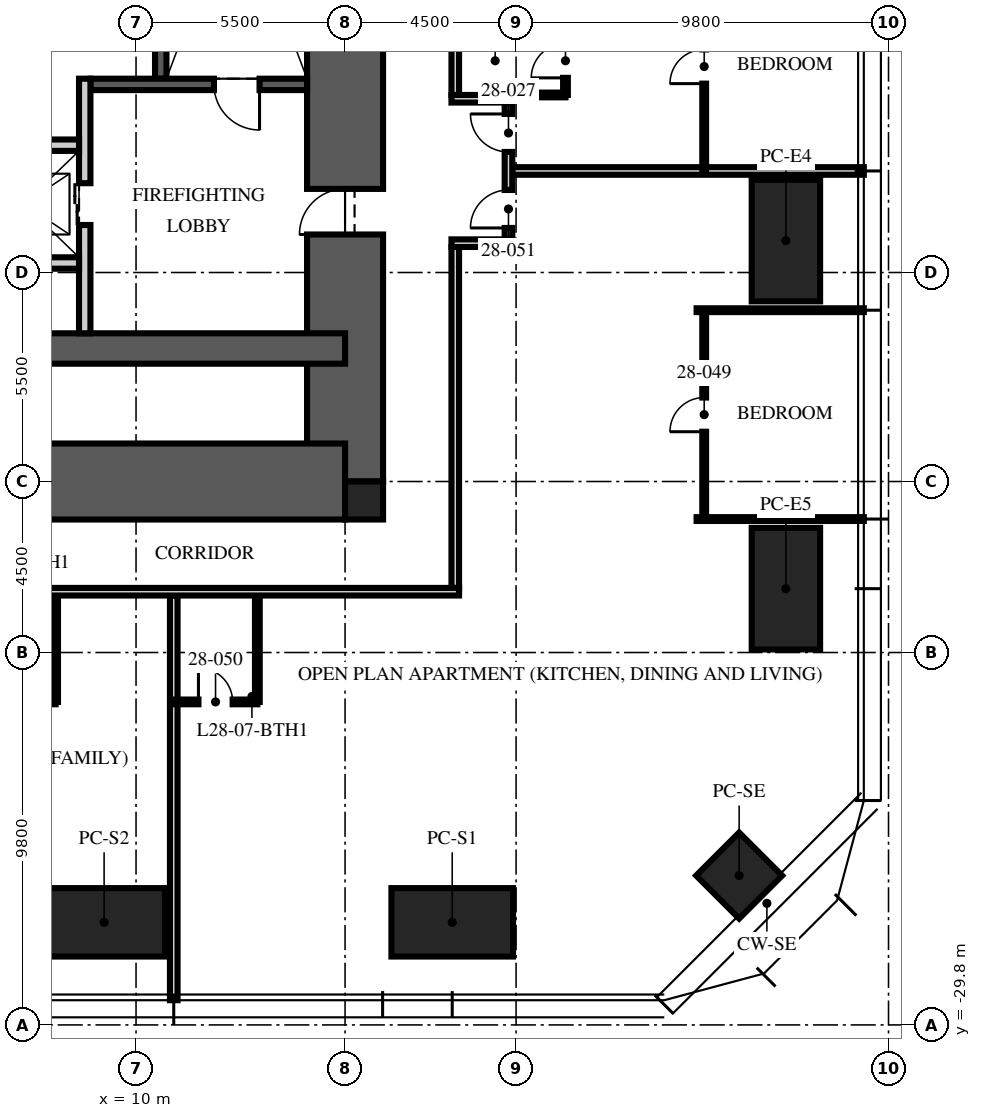
"""IFC4 building model, lengths in metres.
Left out: names, types, materials, properties, quantities, classifications, styles, units other than length and angle.
Written with IfcOpenShell. Run it as: python <this file> out.ifc"""

import sys

from ifc_helpers import new_model, si_unit, direction, frame, frame_2d, origin, origin_2d, place, context, subcontext, project, spatial, rectangle, hollow_rectangle, extrude, element, fill, save


model = new_model("IFC4")
c1 = context("Model", 3, precision=1e-05, world=origin(), true_north=direction((0.0, 1.0)))
c2 = subcontext(c1, "Body", "Model", "MODEL_VIEW")
j1 = project(units=[si_unit("LENGTHUNIT", "METRE"), si_unit("PLANEANGLEUNIT", "RADIAN")], contexts=[c1])
p1 = place(None, origin())
s1 = spatial("IfcSite", under=j1, at=p1, CompositionType="ELEMENT")
p2 = place(p1, origin())
s2 = spatial("IfcBuilding", under=s1, at=p2, CompositionType="ELEMENT")
p3 = place(p2, frame((0.0, 0.0, 114.75)))
s3 = spatial("IfcBuildingStorey", under=s2, at=p3, CompositionType="ELEMENT", Elevation=114.75)
p4 = place(p3, frame((15.5, -15.5, -0.25), z_axis=(0.0, 0.0, 1.0), x_axis=(0.0, 1.0, 0.0)))
e1 = element("IfcWall", 1, at=p4, inside=s3, PredefinedType="SHEAR", context=c2, shape_type="SweptSolid", body=[
    extrude(rectangle(XDim=31.0, YDim=2.0, at=frame_2d((15.5, 0.0))), origin(), (0.0, 0.0, 1.0), 3.75),
])
p5 = place(p4, frame((6.5, 0.0, 0.25)))
e2 = element("IfcOpeningElement", 2, at=p5, cuts=e1, PredefinedType="OPENING", context=c2, shape_type="SweptSolid", body=[
    extrude(rectangle(XDim=1.2, YDim=2.1, at=frame_2d((0.6, 1.05))), frame((0.0, 1.01, 0.0), z_axis=(0.0, -1.0, 0.0), x_axis=(1.0, 0.0, 0.0)), (0.0, 0.0, 1.0), 2.02),
])
p6 = place(p4, frame((23.0, 0.0, 0.25)))
e3 = element("IfcOpeningElement", 3, at=p6, cuts=e1, PredefinedType="OPENING", context=c2, shape_type="SweptSolid", body=[
    extrude(rectangle(XDim=1.8, YDim=2.1, at=frame_2d((0.9, 1.05))), frame((0.0, 1.01, 0.0), z_axis=(0.0, -1.0, 0.0), x_axis=(1.0, 0.0, 0.0)), (0.0, 0.0, 1.0), 2.02),
])
p7 = place(p3, frame((-15.5, -15.5, -0.25), z_axis=(0.0, 0.0, 1.0), x_axis=(1.0, 0.0, 0.0)))
e4 = element("IfcWall", 4, at=p7, inside=s3, PredefinedType="SHEAR", context=c2, shape_type="SweptSolid", body=[
    extrude(rectangle(XDim=31.0, YDim=2.0, at=frame_2d((15.5, 0.0))), origin(), (0.0, 0.0, 1.0), 3.75),
])
p8 = place(p7, frame((10.4, 0.0, 0.25)))
e5 = element("IfcOpeningElement", 5, at=p8, cuts=e4, PredefinedType="OPENING", context=c2, shape_type="SweptSolid", body=[
    extrude(rectangle(XDim=1.1, YDim=2.1, at=frame_2d((0.55, 1.05))), frame((0.0, 1.01, 0.0), z_axis=(0.0, -1.0, 0.0), x_axis=(1.0, 0.0, 0.0)), (0.0, 0.0, 1.0), 2.02),
])
p9 = place(p7, frame((13.5, 0.0, 0.25)))
e6 = element("IfcOpeningElement", 6, at=p9, cuts=e4, PredefinedType="OPENING", context=c2, shape_type="SweptSolid", body=[
    extrude(rectangle(XDim=1.1, YDim=2.1, at=frame_2d((0.55, 1.05))), frame((0.0, 1.01, 0.0), z_axis=(0.0, -1.0, 0.0), x_axis=(1.0, 0.0, 0.0)), (0.0, 0.0, 1.0), 2.02),
])
p10 = place(p7, frame((16.6, 0.0, 0.25)))
e7 = element("IfcOpeningElement", 7, at=p10, cuts=e4, PredefinedType="OPENING", context=c2, shape_type="SweptSolid", body=[
    extrude(rectangle(XDim=1.1, YDim=2.1, at=frame_2d((0.55, 1.05))), frame((0.0, 1.01, 0.0), z_axis=(0.0, -1.0, 0.0), x_axis=(1.0, 0.0, 0.0)), (0.0, 0.0, 1.0), 2.02),
])
p11 = place(p3, frame((-15.5, -12.0, -0.25), z_axis=(0.0, 0.0, 1.0), x_axis=(1.0, 0.0, 0.0)))
e8 = element("IfcWall", 8, at=p11, inside=s3, PredefinedType="SHEAR", context=c2, shape_type="SweptSolid", body=[
    extrude(rectangle(XDim=31.0, YDim=0.8, at=frame_2d((15.5, 0.0))), origin(), (0.0, 0.0, 1.0), 3.75),
])
p12 = place(p3, frame((16.0, -16.0, -0.25), z_axis=(0.0, 0.0, 1.0), x_axis=(1.0, 0.0, 0.0)))
e9 = element("IfcColumn", 9, at=p12, inside=s3, PredefinedType="COLUMN", context=c2, shape_type="SweptSolid", body=[
    extrude(rectangle(XDim=1.0, YDim=1.0, at=origin_2d()), origin(), (0.0, 0.0, 1.0), 3.75),
])
for number, where, z_axis, x_axis in (
    (10, (27.1, -9.16, 0.0), (0.0, 0.0, 1.0), (0.0, 1.0, 0.0)),
    (11, (27.1, -18.32, 0.0), (0.0, 0.0, 1.0), (0.0, 1.0, 0.0)),
    (12, (18.32, -27.1, 0.0), (0.0, 0.0, 1.0), (1.0, 0.0, 0.0)),
    (13, (9.16, -27.1, 0.0), (0.0, 0.0, 1.0), (1.0, 0.0, 0.0)),
):
    element("IfcColumn", number, at=place(p3, frame(where, z_axis=z_axis, x_axis=x_axis)), inside=s3, PredefinedType="COLUMN", context=c2, shape_type="SweptSolid", body=[
        extrude(hollow_rectangle(XDim=3.2, YDim=1.8, WallThickness=0.2, at=origin_2d()), origin(), (0.0, 0.0, 1.0), 3.75),
    ])
p13 = place(p3, frame((25.87, -25.87, 0.0), z_axis=(0.0, 0.0, 1.0), x_axis=(0.707106781187, 0.707106781187, 0.0)))
e14 = element("IfcColumn", 14, at=p13, inside=s3, PredefinedType="COLUMN", context=c2, shape_type="SweptSolid", body=[
    extrude(hollow_rectangle(XDim=1.6, YDim=1.6, WallThickness=0.1, at=origin_2d()), origin(), (0.0, 0.0, 1.0), 3.75),
])
p14 = place(p3, frame((10.65, -4.9, 0.0), z_axis=(0.0, 0.0, 1.0), x_axis=(0.0, 1.0, 0.0)))
e15 = element("IfcWall", 15, at=p14, inside=s3, PredefinedType="SOLIDWALL", context=c2, shape_type="SweptSolid", body=[
    extrude(rectangle(XDim=10.1, YDim=0.3, at=frame_2d((5.05, 0.0))), origin(), (0.0, 0.0, 1.0), 3.5),
])
p15 = place(p3, frame((14.5, -5.05, 0.0), z_axis=(0.0, 0.0, 1.0), x_axis=(-1.0, 0.0, 0.0)))
e16 = element("IfcWall", 16, at=p15, inside=s3, PredefinedType="SOLIDWALL", context=c2, shape_type="SweptSolid", body=[
    extrude(rectangle(XDim=5.7, YDim=0.3, at=frame_2d((2.85, 0.0))), origin(), (0.0, 0.0, 1.0), 3.5),
])
p16 = place(p15, frame((1.25, 0.0, 0.0)))
e17 = element("IfcOpeningElement", 17, at=p16, cuts=e16, PredefinedType="OPENING", context=c2, shape_type="SweptSolid", body=[
    extrude(rectangle(XDim=1.2, YDim=2.1, at=frame_2d((0.6, 1.05))), frame((0.0, 0.16, 0.0), z_axis=(0.0, -1.0, 0.0), x_axis=(1.0, 0.0, 0.0)), (0.0, 0.0, 1.0), 0.32),
])
p17 = place(p3, frame((8.65, -11.6, 0.0), z_axis=(0.0, 0.0, 1.0), x_axis=(0.0, 1.0, 0.0)))
e18 = element("IfcWall", 18, at=p17, inside=s3, PredefinedType="PARTITIONING", context=c2, shape_type="SweptSolid", body=[
    extrude(rectangle(XDim=6.7, YDim=0.3, at=frame_2d((3.35, 0.0))), origin(), (0.0, 0.0, 1.0), 3.5),
])
p18 = place(p17, frame((2.85, 0.0, 0.0)))
e19 = element("IfcOpeningElement", 19, at=p18, cuts=e18, PredefinedType="OPENING", context=c2, shape_type="SweptSolid", body=[
    extrude(rectangle(XDim=1.1, YDim=2.1, at=frame_2d((0.55, 1.05))), frame((0.0, 0.16, 0.0), z_axis=(0.0, -1.0, 0.0), x_axis=(1.0, 0.0, 0.0)), (0.0, 0.0, 1.0), 0.32),
])
p19 = place(p3, frame((-8.5, -6.65, 0.0), z_axis=(0.0, 0.0, 1.0), x_axis=(1.0, 0.0, 0.0)))
e20 = element("IfcWall", 20, at=p19, inside=s3, PredefinedType="PARTITIONING", context=c2, shape_type="SweptSolid", body=[
    extrude(rectangle(XDim=17.0, YDim=0.3, at=frame_2d((8.5, 0.0))), origin(), (0.0, 0.0, 1.0), 3.5),
])
p20 = place(p19, frame((7.8, 0.0, 0.0)))
e21 = element("IfcOpeningElement", 21, at=p20, cuts=e20, PredefinedType="OPENING", context=c2, shape_type="SweptSolid", body=[
    extrude(rectangle(XDim=1.3, YDim=2.4, at=frame_2d((0.65, 1.2))), frame((0.0, 0.16, 0.0), z_axis=(0.0, -1.0, 0.0), x_axis=(1.0, 0.0, 0.0)), (0.0, 0.0, 1.0), 0.32),
])
p21 = place(p19, frame((5.65, 0.0, 0.0)))
e22 = element("IfcOpeningElement", 22, at=p21, cuts=e20, PredefinedType="OPENING", context=c2, shape_type="SweptSolid", body=[
    extrude(rectangle(XDim=0.9, YDim=2.1, at=frame_2d((0.45, 1.05))), frame((0.0, 0.16, 0.0), z_axis=(0.0, -1.0, 0.0), x_axis=(1.0, 0.0, 0.0)), (0.0, 0.0, 1.0), 0.32),
])
p22 = place(p19, frame((10.4, 0.0, 0.0)))
e23 = element("IfcOpeningElement", 23, at=p22, cuts=e20, PredefinedType="OPENING", context=c2, shape_type="SweptSolid", body=[
    extrude(rectangle(XDim=0.9, YDim=2.1, at=frame_2d((0.45, 1.05))), frame((0.0, 0.16, 0.0), z_axis=(0.0, -1.0, 0.0), x_axis=(1.0, 0.0, 0.0)), (0.0, 0.0, 1.0), 0.32),
])
p23 = place(p3, frame((5.6, -9.75, 0.0), z_axis=(0.0, 0.0, 1.0), x_axis=(1.0, 0.0, 0.0)))
e24 = element("IfcWall", 24, at=p23, inside=s3, PredefinedType="PARTITIONING", context=c2, shape_type="SweptSolid", body=[
    extrude(rectangle(XDim=2.9, YDim=0.3, at=frame_2d((1.45, 0.0))), origin(), (0.0, 0.0, 1.0), 3.5),
])
p24 = place(p3, frame((19.9, -7.328, 0.0), z_axis=(0.0, 0.0, 1.0), x_axis=(1.0, 0.0, 0.0)))
e25 = element("IfcWall", 25, at=p24, inside=s3, PredefinedType="PARTITIONING", context=c2, shape_type="SweptSolid", body=[
    extrude(rectangle(XDim=9.25, YDim=0.2, at=frame_2d((4.625, 0.0))), origin(), (0.0, 0.0, 1.0), 2.81),
])
p25 = place(p3, frame((10.992, -18.5, 0.0), z_axis=(0.0, 0.0, 1.0), x_axis=(0.0, -1.0, 0.0)))
e26 = element("IfcWall", 26, at=p25, inside=s3, PredefinedType="PARTITIONING", context=c2, shape_type="SweptSolid", body=[
    extrude(rectangle(XDim=10.65, YDim=0.2, at=frame_2d((5.325, 0.0))), origin(), (0.0, 0.0, 1.0), 2.81),
])
for number, where, z_axis, x_axis in (
    (27, (24.75, -16.488, 0.0), (0.0, 0.0, 1.0), (1.0, 0.0, 0.0)),
    (28, (24.75, -10.992, 0.0), (0.0, 0.0, 1.0), (1.0, 0.0, 0.0)),
):
    element("IfcWall", number, at=place(p3, frame(where, z_axis=z_axis, x_axis=x_axis)), inside=s3, PredefinedType="PARTITIONING", context=c2, shape_type="SweptSolid", body=[
        extrude(rectangle(XDim=4.4, YDim=0.1, at=frame_2d((2.2, 0.0))), origin(), (0.0, 0.0, 1.0), 2.81),
    ])
p26 = place(p3, frame((24.95, -7.328, 0.0), z_axis=(0.0, 0.0, 1.0), x_axis=(0.0, 1.0, 0.0)))
e29 = element("IfcWall", 29, at=p26, inside=s3, PredefinedType="PARTITIONING", context=c2, shape_type="SweptSolid", body=[
    extrude(rectangle(XDim=5.496, YDim=0.1, at=frame_2d((2.748, 0.0))), origin(), (0.0, 0.0, 1.0), 2.81),
])
p27 = place(p26, frame((2.298, 0.0, 0.0)))
e30 = element("IfcOpeningElement", 30, at=p27, cuts=e29, PredefinedType="OPENING", context=c2, shape_type="SweptSolid", body=[
    extrude(rectangle(XDim=0.9, YDim=2.1, at=frame_2d((0.45, 1.05))), frame((0.0, 0.06, 0.0), z_axis=(0.0, -1.0, 0.0), x_axis=(1.0, 0.0, 0.0)), (0.0, 0.0, 1.0), 0.12),
])
p28 = place(p3, frame((21.3, -5.328, 0.0), z_axis=(0.0, 0.0, 1.0), x_axis=(0.0, 1.0, 0.0)))
e31 = element("IfcWall", 31, at=p28, inside=s3, PredefinedType="PARTITIONING", context=c2, shape_type="SweptSolid", body=[
    extrude(rectangle(XDim=1.8, YDim=0.125, at=frame_2d((0.9, 0.0))), origin(), (0.0, 0.0, 1.0), 2.81),
])
p29 = place(p28, frame((0.45, 0.0, 0.0)))
e32 = element("IfcOpeningElement", 32, at=p29, cuts=e31, PredefinedType="OPENING", context=c2, shape_type="SweptSolid", body=[
    extrude(rectangle(XDim=0.9, YDim=2.1, at=frame_2d((0.45, 1.05))), frame((0.0, 0.073, 0.0), z_axis=(0.0, -1.0, 0.0), x_axis=(1.0, 0.0, 0.0)), (0.0, 0.0, 1.0), 0.145),
])
p30 = place(p3, frame((19.97, -5.328, 0.0), z_axis=(0.0, 0.0, 1.0), x_axis=(1.0, 0.0, 0.0)))
e33 = element("IfcWall", 33, at=p30, inside=s3, PredefinedType="PARTITIONING", context=c2, shape_type="SweptSolid", body=[
    extrude(rectangle(XDim=1.33, YDim=0.125, at=frame_2d((0.665, 0.0))), origin(), (0.0, 0.0, 1.0), 3.5),
])
p31 = place(p3, frame((5.684, -21.3, 0.0), z_axis=(0.0, 0.0, 1.0), x_axis=(1.0, 0.0, 0.0)))
e34 = element("IfcWall", 34, at=p31, inside=s3, PredefinedType="PARTITIONING", context=c2, shape_type="SweptSolid", body=[
    extrude(rectangle(XDim=2.2, YDim=0.125, at=frame_2d((1.1, 0.0))), origin(), (0.0, 0.0, 1.0), 3.5),
])
p32 = place(p31, frame((0.65, 0.0, 0.0)))
e35 = element("IfcOpeningElement", 35, at=p32, cuts=e34, PredefinedType="OPENING", context=c2, shape_type="SweptSolid", body=[
    extrude(rectangle(XDim=0.9, YDim=2.1, at=frame_2d((0.45, 1.05))), frame((0.0, 0.073, 0.0), z_axis=(0.0, -1.0, 0.0), x_axis=(1.0, 0.0, 0.0)), (0.0, 0.0, 1.0), 0.145),
])
p33 = place(p3, frame((7.884, -18.5, 0.0), z_axis=(0.0, 0.0, 1.0), x_axis=(0.0, -1.0, 0.0)))
e36 = element("IfcWall", 36, at=p33, inside=s3, PredefinedType="PARTITIONING", context=c2, shape_type="SweptSolid", body=[
    extrude(rectangle(XDim=2.8, YDim=0.125, at=frame_2d((1.4, 0.0))), origin(), (0.0, 0.0, 1.0), 3.5),
])
p34 = place(p3, frame((24.95, -16.488, 0.0), z_axis=(0.0, 0.0, 1.0), x_axis=(0.0, 1.0, 0.0)))
e37 = element("IfcWall", 37, at=p34, inside=s3, PredefinedType="PARTITIONING", context=c2, shape_type="SweptSolid", body=[
    extrude(rectangle(XDim=5.496, YDim=0.1, at=frame_2d((2.748, 0.0))), origin(), (0.0, 0.0, 1.0), 2.81),
])
p35 = place(p34, frame((2.298, 0.0, 0.0)))
e38 = element("IfcOpeningElement", 38, at=p35, cuts=e37, PredefinedType="OPENING", context=c2, shape_type="SweptSolid", body=[
    extrude(rectangle(XDim=0.9, YDim=2.1, at=frame_2d((0.45, 1.05))), frame((0.0, 0.06, 0.0), z_axis=(0.0, -1.0, 0.0), x_axis=(1.0, 0.0, 0.0)), (0.0, 0.0, 1.0), 0.12),
])
p36 = place(p3, frame((10.992, -21.3, 0.0), z_axis=(0.0, 0.0, 1.0), x_axis=(1.0, 0.0, 0.0)))
e39 = element("IfcWall", 39, at=p36, inside=s3, PredefinedType="PARTITIONING", context=c2, shape_type="SweptSolid", body=[
    extrude(rectangle(XDim=2.2, YDim=0.125, at=frame_2d((1.1, 0.0))), origin(), (0.0, 0.0, 1.0), 3.5),
])
p37 = place(p36, frame((0.65, 0.0, 0.0)))
e40 = element("IfcOpeningElement", 40, at=p37, cuts=e39, PredefinedType="OPENING", context=c2, shape_type="SweptSolid", body=[
    extrude(rectangle(XDim=0.9, YDim=2.1, at=frame_2d((0.45, 1.05))), frame((0.0, 0.073, 0.0), z_axis=(0.0, -1.0, 0.0), x_axis=(1.0, 0.0, 0.0)), (0.0, 0.0, 1.0), 0.145),
])
p38 = place(p3, frame((13.192, -18.5, 0.0), z_axis=(0.0, 0.0, 1.0), x_axis=(0.0, -1.0, 0.0)))
e41 = element("IfcWall", 41, at=p38, inside=s3, PredefinedType="PARTITIONING", context=c2, shape_type="SweptSolid", body=[
    extrude(rectangle(XDim=2.8, YDim=0.125, at=frame_2d((1.4, 0.0))), origin(), (0.0, 0.0, 1.0), 3.5),
])
p39 = place(p3, frame((18.4, -18.3, 0.0), z_axis=(0.0, 0.0, 1.0), x_axis=(0.0, 1.0, 0.0)))
e42 = element("IfcWall", 42, at=p39, inside=s3, PredefinedType="PARTITIONING", context=c2, shape_type="SweptSolid", body=[
    extrude(rectangle(XDim=8.972, YDim=0.2, at=frame_2d((4.486, 0.0))), origin(), (0.0, 0.0, 1.0), 2.3),
])
p40 = place(p3, frame((18.3, -9.228, 0.0), z_axis=(0.0, 0.0, 1.0), x_axis=(1.0, 0.0, 0.0)))
e43 = element("IfcWall", 43, at=p40, inside=s3, PredefinedType="PARTITIONING", context=c2, shape_type="SweptSolid", body=[
    extrude(rectangle(XDim=1.6, YDim=0.2, at=frame_2d((0.8, 0.0))), origin(), (0.0, 0.0, 1.0), 2.7),
])
p41 = place(p3, frame((18.3, -5.428, 0.0), z_axis=(0.0, 0.0, 1.0), x_axis=(1.0, 0.0, 0.0)))
e44 = element("IfcWall", 44, at=p41, inside=s3, PredefinedType="PARTITIONING", context=c2, shape_type="SweptSolid", body=[
    extrude(rectangle(XDim=1.6, YDim=0.2, at=frame_2d((0.8, 0.0))), origin(), (0.0, 0.0, 1.0), 3.5),
])
p42 = place(p3, frame((19.8, -9.128, 0.0), z_axis=(0.0, 0.0, 1.0), x_axis=(0.0, 1.0, 0.0)))
e45 = element("IfcWall", 45, at=p42, inside=s3, PredefinedType="PARTITIONING", context=c2, shape_type="SweptSolid", body=[
    extrude(rectangle(XDim=3.6, YDim=0.2, at=frame_2d((1.8, 0.0))), origin(), (0.0, 0.0, 1.0), 2.7),
])
p43 = place(p42, frame((2.3, 0.0, 0.0)))
e46 = element("IfcOpeningElement", 46, at=p43, cuts=e45, PredefinedType="OPENING", context=c2, shape_type="SweptSolid", body=[
    extrude(rectangle(XDim=1.0, YDim=2.2, at=frame_2d((0.5, 1.1))), frame((0.0, 0.11, 0.0), z_axis=(0.0, -1.0, 0.0), x_axis=(1.0, 0.0, 0.0)), (0.0, 0.0, 1.0), 0.22),
])
p44 = place(p42, frame((0.3, 0.0, 0.0)))
e47 = element("IfcOpeningElement", 47, at=p44, cuts=e45, PredefinedType="OPENING", context=c2, shape_type="SweptSolid", body=[
    extrude(rectangle(XDim=1.0, YDim=2.2, at=frame_2d((0.5, 1.1))), frame((0.0, 0.11, 0.0), z_axis=(0.0, -1.0, 0.0), x_axis=(1.0, 0.0, 0.0)), (0.0, 0.0, 1.0), 0.22),
])
p45 = place(p3, frame((18.4, -5.328, 0.0), z_axis=(0.0, 0.0, 1.0), x_axis=(0.0, 1.0, 0.0)))
e48 = element("IfcWall", 48, at=p45, inside=s3, PredefinedType="PARTITIONING", context=c2, shape_type="SweptSolid", body=[
    extrude(rectangle(XDim=22.028, YDim=0.2, at=frame_2d((11.014, 0.0))), origin(), (0.0, 0.0, 1.0), 2.7),
])
p46 = place(p45, frame((19.84, 0.0, 0.0)))
e49 = element("IfcOpeningElement", 49, at=p46, cuts=e48, PredefinedType="OPENING", context=c2, shape_type="SweptSolid", body=[
    extrude(rectangle(XDim=1.0, YDim=2.2, at=frame_2d((0.5, 1.1))), frame((0.0, 0.11, 0.0), z_axis=(0.0, -1.0, 0.0), x_axis=(1.0, 0.0, 0.0)), (0.0, 0.0, 1.0), 0.22),
])
p47 = place(p3, frame((18.5, -18.4, 0.0), z_axis=(0.0, 0.0, 1.0), x_axis=(-1.0, 0.0, 0.0)))
e50 = element("IfcWall", 50, at=p47, inside=s3, PredefinedType="PARTITIONING", context=c2, shape_type="SweptSolid", body=[
    extrude(rectangle(XDim=12.9, YDim=0.2, at=frame_2d((6.45, 0.0))), origin(), (0.0, 0.0, 1.0), 2.3),
])
p48 = place(p16, origin())
e51 = element("IfcDoor", 51, at=p48, inside=s3, OperationType="SINGLE_SWING_LEFT", PredefinedType="DOOR", context=c2, shape_type="SweptSolid", body=[
    extrude(rectangle(XDim=1.2, YDim=2.1, at=frame_2d((0.6, 1.05))), frame((0.0, 0.025, 0.0), z_axis=(0.0, -1.0, 0.0), x_axis=(1.0, 0.0, 0.0)), (0.0, 0.0, 1.0), 0.05),
])
fill(e17, e51)
p49 = place(p5, origin())
e52 = element("IfcDoor", 52, at=p49, inside=s3, OperationType="SINGLE_SWING_LEFT", PredefinedType="DOOR", context=c2, shape_type="SweptSolid", body=[
    extrude(rectangle(XDim=1.2, YDim=2.1, at=frame_2d((0.6, 1.05))), frame((0.0, 0.025, 0.0), z_axis=(0.0, -1.0, 0.0), x_axis=(1.0, 0.0, 0.0)), (0.0, 0.0, 1.0), 0.05),
])
fill(e2, e52)
p50 = place(p18, origin())
e53 = element("IfcDoor", 53, at=p50, inside=s3, OperationType="DOUBLE_DOOR_SLIDING", PredefinedType="DOOR", context=c2, shape_type="SweptSolid", body=[
    extrude(rectangle(XDim=1.1, YDim=2.1, at=frame_2d((0.55, 1.05))), frame((0.0, 0.025, 0.0), z_axis=(0.0, -1.0, 0.0), x_axis=(1.0, 0.0, 0.0)), (0.0, 0.0, 1.0), 0.05),
])
fill(e19, e53)
p51 = place(p27, origin())
e54 = element("IfcDoor", 54, at=p51, inside=s3, OperationType="SINGLE_SWING_LEFT", PredefinedType="DOOR", context=c2, shape_type="SweptSolid", body=[
    extrude(rectangle(XDim=0.9, YDim=2.1, at=frame_2d((0.45, 1.05))), frame((0.0, 0.025, 0.0), z_axis=(0.0, -1.0, 0.0), x_axis=(1.0, 0.0, 0.0)), (0.0, 0.0, 1.0), 0.05),
])
fill(e30, e54)
p52 = place(p29, origin())
e55 = element("IfcDoor", 55, at=p52, inside=s3, OperationType="SINGLE_SWING_LEFT", PredefinedType="DOOR", context=c2, shape_type="SweptSolid", body=[
    extrude(rectangle(XDim=0.9, YDim=2.1, at=frame_2d((0.45, 1.05))), frame((0.0, 0.025, 0.0), z_axis=(0.0, -1.0, 0.0), x_axis=(1.0, 0.0, 0.0)), (0.0, 0.0, 1.0), 0.05),
])
fill(e32, e55)
p53 = place(p43, origin())
e56 = element("IfcDoor", 56, at=p53, inside=s3, OperationType="SINGLE_SWING_RIGHT", PredefinedType="DOOR", context=c2, shape_type="SweptSolid", body=[
    extrude(rectangle(XDim=1.0, YDim=2.2, at=frame_2d((0.5, 1.1))), frame((0.0, 0.025, 0.0), z_axis=(0.0, -1.0, 0.0), x_axis=(1.0, 0.0, 0.0)), (0.0, 0.0, 1.0), 0.05),
])
fill(e46, e56)
p54 = place(p35, origin())
e57 = element("IfcDoor", 57, at=p54, inside=s3, OperationType="SINGLE_SWING_LEFT", PredefinedType="DOOR", context=c2, shape_type="SweptSolid", body=[
    extrude(rectangle(XDim=0.9, YDim=2.1, at=frame_2d((0.45, 1.05))), frame((0.0, 0.025, 0.0), z_axis=(0.0, -1.0, 0.0), x_axis=(1.0, 0.0, 0.0)), (0.0, 0.0, 1.0), 0.05),
])
fill(e38, e57)
p55 = place(p37, origin())
e58 = element("IfcDoor", 58, at=p55, inside=s3, OperationType="SINGLE_SWING_LEFT", PredefinedType="DOOR", context=c2, shape_type="SweptSolid", body=[
    extrude(rectangle(XDim=0.9, YDim=2.1, at=frame_2d((0.45, 1.05))), frame((0.0, 0.025, 0.0), z_axis=(0.0, -1.0, 0.0), x_axis=(1.0, 0.0, 0.0)), (0.0, 0.0, 1.0), 0.05),
])
fill(e40, e58)
p56 = place(p44, origin())
e59 = element("IfcDoor", 59, at=p56, inside=s3, OperationType="SINGLE_SWING_LEFT", PredefinedType="DOOR", context=c2, shape_type="SweptSolid", body=[
    extrude(rectangle(XDim=1.0, YDim=2.2, at=frame_2d((0.5, 1.1))), frame((0.0, 0.025, 0.0), z_axis=(0.0, -1.0, 0.0), x_axis=(1.0, 0.0, 0.0)), (0.0, 0.0, 1.0), 0.05),
])
fill(e47, e59)
save(model, sys.argv[1])
